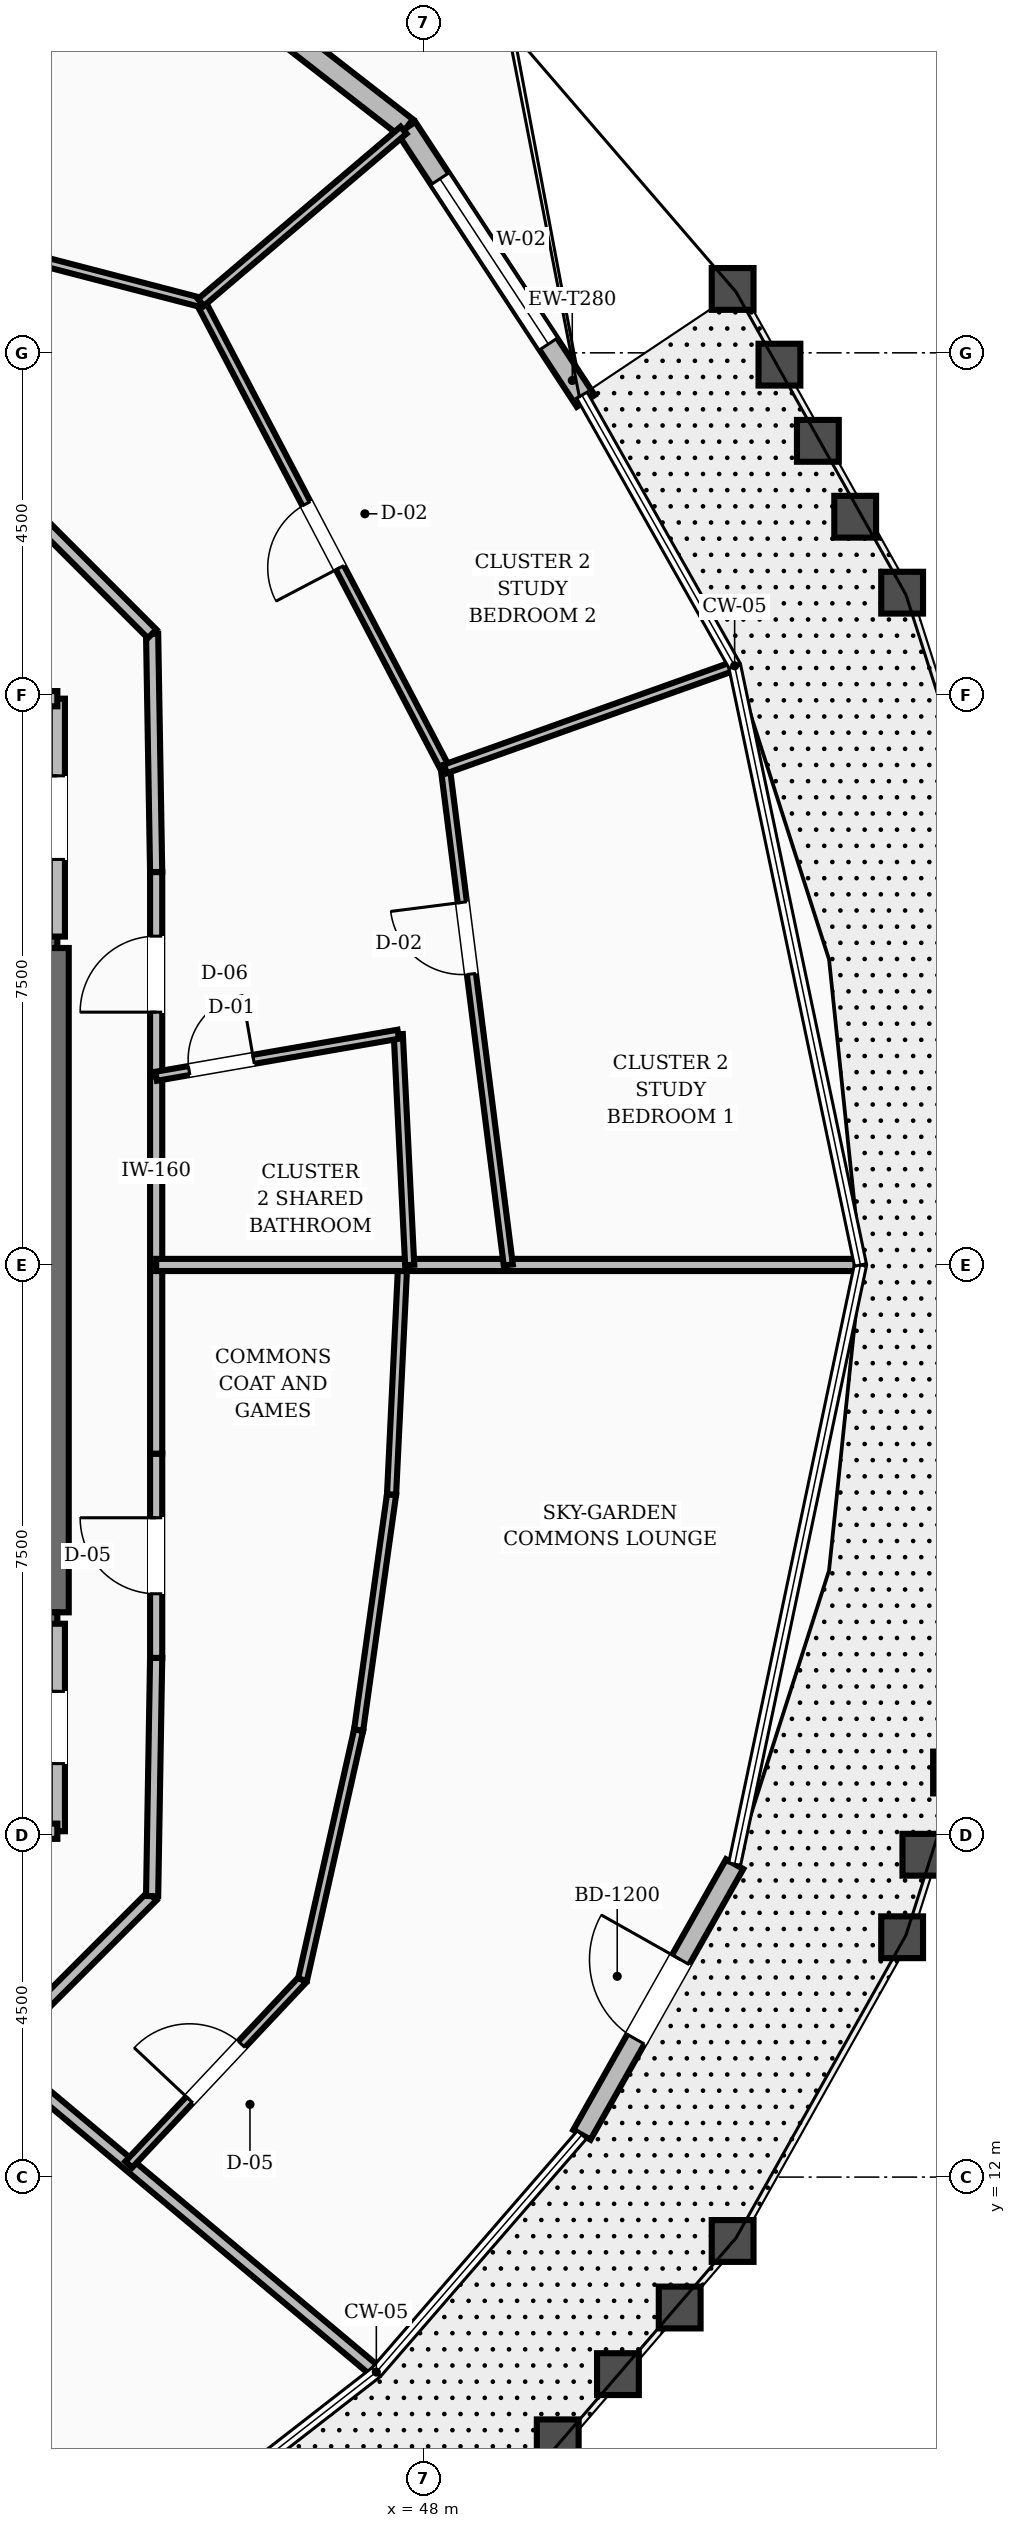
"""IFC4 building model, lengths in metres.
Left out: names, types, materials, properties, quantities, classifications, styles, units other than length and angle.
Written with IfcOpenShell. Run it as: python <this file> out.ifc"""

import sys

from ifc_helpers import new_model, si_unit, direction, frame, frame_2d, origin, place, context, subcontext, project, spatial, rectangle, extrude, element, fill, save


model = new_model("IFC4")
c1 = context("Model", 3, precision=1e-05, world=origin(), true_north=direction((0.0, 1.0)))
c2 = subcontext(c1, "Body", "Model", "MODEL_VIEW")
j1 = project(units=[si_unit("LENGTHUNIT", "METRE"), si_unit("PLANEANGLEUNIT", "RADIAN")], contexts=[c1])
p1 = place(None, origin())
s1 = spatial("IfcSite", under=j1, at=p1, CompositionType="ELEMENT")
p2 = place(p1, origin())
s2 = spatial("IfcBuilding", under=s1, at=p2, CompositionType="ELEMENT")
p3 = place(p2, frame((0.0, 0.0, 232.8)))
s3 = spatial("IfcBuildingStorey", under=s2, at=p3, CompositionType="ELEMENT", Elevation=232.8)
p4 = place(p3, frame((43.18, 19.43, 0.0), z_axis=(0.0, 0.0, 1.0), x_axis=(0.0, 1.0, 0.0)))
e1 = element("IfcWall", 1, at=p4, inside=s3, PredefinedType="SHEAR", context=c2, shape_type="SweptSolid", body=[
    extrude(rectangle(XDim=8.74, YDim=0.3, at=frame_2d((4.37, 0.0))), origin(), (0.0, 0.0, 1.0), 3.6),
])
p5 = place(p3, frame((39.58, 19.28, 0.0), z_axis=(0.0, 0.0, 1.0), x_axis=(1.0, 0.0, 0.0)))
e2 = element("IfcWall", 2, at=p5, inside=s3, PredefinedType="SHEAR", context=c2, shape_type="SweptSolid", body=[
    extrude(rectangle(XDim=3.6, YDim=0.3, at=frame_2d((1.8, 0.0))), origin(), (0.0, 0.0, 1.0), 3.6),
])
p6 = place(p3, frame((39.58, 28.32, 0.0), z_axis=(0.0, 0.0, 1.0), x_axis=(1.0, 0.0, 0.0)))
e3 = element("IfcWall", 3, at=p6, inside=s3, PredefinedType="SHEAR", context=c2, shape_type="SweptSolid", body=[
    extrude(rectangle(XDim=3.6, YDim=0.3, at=frame_2d((1.8, 0.0))), origin(), (0.0, 0.0, 1.0), 3.6),
])
p7 = place(p6, frame((1.3, 0.0, 0.0)))
e4 = element("IfcOpeningElement", 4, at=p7, cuts=e3, PredefinedType="OPENING", context=c2, shape_type="SweptSolid", body=[
    extrude(rectangle(XDim=1.1, YDim=2.1, at=frame_2d((0.55, 1.05))), frame((0.0, 0.16, 0.0), z_axis=(0.0, -1.0, 0.0), x_axis=(1.0, 0.0, 0.0)), (0.0, 0.0, 1.0), 0.32),
])
p8 = place(p3, frame((50.132, 35.367, 0.0), z_axis=(0.0, 0.0, 1.0), x_axis=(-0.548657681843, 0.836047096852, 0.0)))
e5 = element("IfcWall", 5, at=p8, inside=s3, PredefinedType="STANDARD", context=c2, shape_type="SweptSolid", body=[
    extrude(rectangle(XDim=4.299, YDim=0.28, at=frame_2d((2.15, 0.0))), origin(), (0.0, 0.0, 1.0), 2.88),
])
p9 = place(p8, frame((0.896, 0.0, 0.8)))
e6 = element("IfcOpeningElement", 6, at=p9, cuts=e5, PredefinedType="OPENING", context=c2, shape_type="SweptSolid", body=[
    extrude(rectangle(XDim=2.6, YDim=1.65, at=frame_2d((1.3, 0.825))), frame((0.0, 0.15, 0.0), z_axis=(0.0, -1.0, 0.0), x_axis=(1.0, 0.0, 0.0)), (0.0, 0.0, 1.0), 0.3),
])
p10 = place(p3, frame((47.773, 38.961, 0.0), z_axis=(0.0, 0.0, 1.0), x_axis=(-0.789112773216, 0.614248346475, 0.0)))
e7 = element("IfcWall", 7, at=p10, inside=s3, PredefinedType="STANDARD", context=c2, shape_type="SweptSolid", body=[
    extrude(rectangle(XDim=4.283, YDim=0.28, at=frame_2d((2.142, 0.0))), origin(), (0.0, 0.0, 1.0), 2.88),
])
p11 = place(p3, frame((50.081, 12.556, 0.0), z_axis=(0.0, 0.0, 1.0), x_axis=(0.491457065187, 0.870901804498, 0.0)))
e8 = element("IfcWall", 8, at=p11, inside=s3, PredefinedType="STANDARD", context=c2, shape_type="SweptSolid", body=[
    extrude(rectangle(XDim=4.089, YDim=0.26, at=frame_2d((2.044, 0.0))), origin(), (0.0, 0.0, 1.0), 2.88),
])
p12 = place(p11, frame((1.445, 0.0, 0.0)))
e9 = element("IfcOpeningElement", 9, at=p12, cuts=e8, PredefinedType="OPENING", context=c2, shape_type="SweptSolid", body=[
    extrude(rectangle(XDim=1.2, YDim=2.15, at=frame_2d((0.6, 1.075))), frame((0.0, 0.14, 0.0), z_axis=(0.0, -1.0, 0.0), x_axis=(1.0, 0.0, 0.0)), (0.0, 0.0, 1.0), 0.28),
])
p13 = place(p3, frame((43.18, 28.32, 0.0), z_axis=(0.0, 0.0, 1.0), x_axis=(0.0, 1.0, 0.0)))
e10 = element("IfcWall", 10, at=p13, inside=s3, PredefinedType="SOLIDWALL", context=c2, shape_type="SweptSolid", body=[
    extrude(rectangle(XDim=3.13, YDim=0.2, at=frame_2d((1.565, 0.0))), origin(), (0.0, 0.0, 1.0), 2.87),
])
p14 = place(p13, frame((1.015, 0.0, 0.0)))
e11 = element("IfcOpeningElement", 11, at=p14, cuts=e10, PredefinedType="OPENING", context=c2, shape_type="SweptSolid", body=[
    extrude(rectangle(XDim=1.1, YDim=2.1, at=frame_2d((0.55, 1.05))), frame((0.0, 0.11, 0.0), z_axis=(0.0, -1.0, 0.0), x_axis=(1.0, 0.0, 0.0)), (0.0, 0.0, 1.0), 0.22),
])
p15 = place(p3, frame((39.2, 31.45, 0.0), z_axis=(0.0, 0.0, 1.0), x_axis=(1.0, 0.0, 0.0)))
e12 = element("IfcWall", 12, at=p15, inside=s3, PredefinedType="SOLIDWALL", context=c2, shape_type="SweptSolid", body=[
    extrude(rectangle(XDim=3.98, YDim=0.2, at=frame_2d((1.99, 0.0))), origin(), (0.0, 0.0, 1.0), 2.87),
])
p16 = place(p3, frame((43.18, 16.55, 0.0), z_axis=(0.0, 0.0, 1.0), x_axis=(0.0, 1.0, 0.0)))
e13 = element("IfcWall", 13, at=p16, inside=s3, PredefinedType="SOLIDWALL", context=c2, shape_type="SweptSolid", body=[
    extrude(rectangle(XDim=2.73, YDim=0.2, at=frame_2d((1.365, 0.0))), origin(), (0.0, 0.0, 1.0), 2.87),
])
p17 = place(p16, frame((0.89, 0.0, 0.0)))
e14 = element("IfcOpeningElement", 14, at=p17, cuts=e13, PredefinedType="OPENING", context=c2, shape_type="SweptSolid", body=[
    extrude(rectangle(XDim=0.95, YDim=2.1, at=frame_2d((0.475, 1.05))), frame((0.0, 0.11, 0.0), z_axis=(0.0, -1.0, 0.0), x_axis=(1.0, 0.0, 0.0)), (0.0, 0.0, 1.0), 0.22),
])
p18 = place(p3, frame((39.2, 16.55, 0.0), z_axis=(0.0, 0.0, 1.0), x_axis=(1.0, 0.0, 0.0)))
e15 = element("IfcWall", 15, at=p18, inside=s3, PredefinedType="SOLIDWALL", context=c2, shape_type="SweptSolid", body=[
    extrude(rectangle(XDim=3.98, YDim=0.2, at=frame_2d((1.99, 0.0))), origin(), (0.0, 0.0, 1.0), 2.87),
])
p19 = place(p3, frame((44.48, 24.0, 0.0), z_axis=(0.0, 0.0, 1.0), x_axis=(0.0, 1.0, 0.0)))
e16 = element("IfcWall", 16, at=p19, inside=s3, PredefinedType="SOLIDWALL", context=c2, shape_type="SweptSolid", body=[
    extrude(rectangle(XDim=2.482, YDim=0.16, at=frame_2d((1.241, 0.0))), origin(), (0.0, 0.0, 1.0), 2.87),
])
p20 = place(p3, frame((44.48, 26.482, 0.0), z_axis=(0.0, 0.0, 1.0), x_axis=(0.0, 1.0, 0.0)))
e17 = element("IfcWall", 17, at=p20, inside=s3, PredefinedType="SOLIDWALL", context=c2, shape_type="SweptSolid", body=[
    extrude(rectangle(XDim=2.687, YDim=0.16, at=frame_2d((1.344, 0.0))), origin(), (0.0, 0.0, 1.0), 2.87),
])
p21 = place(p20, frame((0.844, 0.0, 0.0)))
e18 = element("IfcOpeningElement", 18, at=p21, cuts=e17, PredefinedType="OPENING", context=c2, shape_type="SweptSolid", body=[
    extrude(rectangle(XDim=1.0, YDim=2.1, at=frame_2d((0.5, 1.05))), frame((0.0, 0.09, 0.0), z_axis=(0.0, -1.0, 0.0), x_axis=(1.0, 0.0, 0.0)), (0.0, 0.0, 1.0), 0.18),
])
p22 = place(p3, frame((44.48, 29.169, 0.0), z_axis=(0.0, 0.0, 1.0), x_axis=(-0.016981035134, 0.999855811828, 0.0)))
e19 = element("IfcWall", 19, at=p22, inside=s3, PredefinedType="SOLIDWALL", context=c2, shape_type="SweptSolid", body=[
    extrude(rectangle(XDim=3.134, YDim=0.16, at=frame_2d((1.567, 0.0))), origin(), (0.0, 0.0, 1.0), 2.87),
])
for number, where, z_axis, x_axis in (
    (20, (44.427, 32.303, 0.0), (0.0, 0.0, 1.0), (-0.707, 0.707, 0.0)),
    (21, (42.365, 13.635, 0.0), (0.0, 0.0, 1.0), (0.707, 0.707, 0.0)),
):
    element("IfcWall", number, at=place(p3, frame(where, z_axis=z_axis, x_axis=x_axis)), inside=s3, PredefinedType="SOLIDWALL", context=c2, shape_type="SweptSolid", body=[
        extrude(rectangle(XDim=2.916, YDim=0.16, at=frame_2d((1.458, 0.0))), origin(), (0.0, 0.0, 1.0), 2.87),
    ])
p23 = place(p3, frame((44.427, 15.697, 0.0), z_axis=(0.0, 0.0, 1.0), x_axis=(0.016981035134, 0.999855811828, 0.0)))
e22 = element("IfcWall", 22, at=p23, inside=s3, PredefinedType="SOLIDWALL", context=c2, shape_type="SweptSolid", body=[
    extrude(rectangle(XDim=3.134, YDim=0.16, at=frame_2d((1.567, 0.0))), origin(), (0.0, 0.0, 1.0), 2.87),
])
p24 = place(p3, frame((44.48, 18.831, 0.0), z_axis=(0.0, 0.0, 1.0), x_axis=(0.0, 1.0, 0.0)))
e23 = element("IfcWall", 23, at=p24, inside=s3, PredefinedType="SOLIDWALL", context=c2, shape_type="SweptSolid", body=[
    extrude(rectangle(XDim=2.687, YDim=0.16, at=frame_2d((1.344, 0.0))), origin(), (0.0, 0.0, 1.0), 2.87),
])
p25 = place(p24, frame((0.844, 0.0, 0.0)))
e24 = element("IfcOpeningElement", 24, at=p25, cuts=e23, PredefinedType="OPENING", context=c2, shape_type="SweptSolid", body=[
    extrude(rectangle(XDim=1.0, YDim=2.1, at=frame_2d((0.5, 1.05))), frame((0.0, 0.09, 0.0), z_axis=(0.0, -1.0, 0.0), x_axis=(1.0, 0.0, 0.0)), (0.0, 0.0, 1.0), 0.18),
])
p26 = place(p3, frame((44.48, 21.518, 0.0), z_axis=(0.0, 0.0, 1.0), x_axis=(0.0, 1.0, 0.0)))
e25 = element("IfcWall", 25, at=p26, inside=s3, PredefinedType="SOLIDWALL", context=c2, shape_type="SweptSolid", body=[
    extrude(rectangle(XDim=2.482, YDim=0.16, at=frame_2d((1.241, 0.0))), origin(), (0.0, 0.0, 1.0), 2.87),
])
p27 = place(p3, frame((42.365, 13.635, 0.0), z_axis=(0.0, 0.0, 1.0), x_axis=(0.766438880931, -0.642317243889, 0.0)))
e26 = element("IfcWall", 26, at=p27, inside=s3, PredefinedType="SOLIDWALL", context=c2, shape_type="SweptSolid", body=[
    extrude(rectangle(XDim=6.489, YDim=0.16, at=frame_2d((3.245, 0.0))), origin(), (0.0, 0.0, 1.0), 2.87),
])
p28 = place(p3, frame((44.119, 12.165, 0.0), z_axis=(0.0, 0.0, 1.0), x_axis=(0.684903797097, 0.728633507823, 0.0)))
e27 = element("IfcWall", 27, at=p28, inside=s3, PredefinedType="PARTITIONING", context=c2, shape_type="SweptSolid", body=[
    extrude(rectangle(XDim=3.339, YDim=0.12, at=frame_2d((1.669, 0.0))), origin(), (0.0, 0.0, 1.0), 2.87),
])
p29 = place(p28, frame((1.169, 0.0, 0.0)))
e28 = element("IfcOpeningElement", 28, at=p29, cuts=e27, PredefinedType="OPENING", context=c2, shape_type="SweptSolid", body=[
    extrude(rectangle(XDim=1.0, YDim=2.1, at=frame_2d((0.5, 1.05))), frame((0.0, 0.07, 0.0), z_axis=(0.0, -1.0, 0.0), x_axis=(1.0, 0.0, 0.0)), (0.0, 0.0, 1.0), 0.14),
])
p30 = place(p3, frame((46.406, 14.598, 0.0), z_axis=(0.0, 0.0, 1.0), x_axis=(0.219303315939, 0.975656730422, 0.0)))
e29 = element("IfcWall", 29, at=p30, inside=s3, PredefinedType="PARTITIONING", context=c2, shape_type="SweptSolid", body=[
    extrude(rectangle(XDim=3.365, YDim=0.12, at=frame_2d((1.683, 0.0))), origin(), (0.0, 0.0, 1.0), 2.87),
])
p31 = place(p3, frame((47.144, 17.881, 0.0), z_axis=(0.0, 0.0, 1.0), x_axis=(0.138416734292, 0.990374074614, 0.0)))
e30 = element("IfcWall", 30, at=p31, inside=s3, PredefinedType="PARTITIONING", context=c2, shape_type="SweptSolid", body=[
    extrude(rectangle(XDim=3.129, YDim=0.12, at=frame_2d((1.564, 0.0))), origin(), (0.0, 0.0, 1.0), 2.87),
])
p32 = place(p3, frame((47.577, 20.98, 0.0), z_axis=(0.0, 0.0, 1.0), x_axis=(0.048366932207, 0.998829635057, 0.0)))
e31 = element("IfcWall", 31, at=p32, inside=s3, PredefinedType="PARTITIONING", context=c2, shape_type="SweptSolid", body=[
    extrude(rectangle(XDim=3.023, YDim=0.12, at=frame_2d((1.512, 0.0))), origin(), (0.0, 0.0, 1.0), 2.87),
])
p33 = place(p3, frame((44.48, 24.0, 0.0), z_axis=(0.0, 0.0, 1.0), x_axis=(1.0, 0.0, 0.0)))
e32 = element("IfcWall", 32, at=p33, inside=s3, PredefinedType="SOLIDWALL", context=c2, shape_type="SweptSolid", body=[
    extrude(rectangle(XDim=9.216, YDim=0.16, at=frame_2d((4.608, 0.0))), origin(), (0.0, 0.0, 1.0), 2.87),
])
p34 = place(p3, frame((47.816, 24.0, 0.0), z_axis=(0.0, 0.0, 1.0), x_axis=(-0.049484864646, 0.998774873618, 0.0)))
e33 = element("IfcWall", 33, at=p34, inside=s3, PredefinedType="PARTITIONING", context=c2, shape_type="SweptSolid", body=[
    extrude(rectangle(XDim=3.039, YDim=0.12, at=frame_2d((1.52, 0.0))), origin(), (0.0, 0.0, 1.0), 2.87),
])
p35 = place(p3, frame((44.48, 26.482, 0.0), z_axis=(0.0, 0.0, 1.0), x_axis=(0.985263255419, 0.171044782212, 0.0)))
e34 = element("IfcWall", 34, at=p35, inside=s3, PredefinedType="PARTITIONING", context=c2, shape_type="SweptSolid", body=[
    extrude(rectangle(XDim=3.233, YDim=0.12, at=frame_2d((1.616, 0.0))), origin(), (0.0, 0.0, 1.0), 2.87),
])
p36 = place(p35, frame((0.44, 0.0, 0.0)))
e35 = element("IfcOpeningElement", 35, at=p36, cuts=e34, PredefinedType="OPENING", context=c2, shape_type="SweptSolid", body=[
    extrude(rectangle(XDim=0.86, YDim=2.1, at=frame_2d((0.43, 1.05))), frame((0.0, 0.07, 0.0), z_axis=(0.0, -1.0, 0.0), x_axis=(1.0, 0.0, 0.0)), (0.0, 0.0, 1.0), 0.14),
])
p37 = place(p3, frame((49.113, 24.0, 0.0), z_axis=(0.0, 0.0, 1.0), x_axis=(-0.125779473563, 0.992058226129, 0.0)))
e36 = element("IfcWall", 36, at=p37, inside=s3, PredefinedType="PARTITIONING", context=c2, shape_type="SweptSolid", body=[
    extrude(rectangle(XDim=6.578, YDim=0.12, at=frame_2d((3.289, 0.0))), origin(), (0.0, 0.0, 1.0), 2.87),
])
p38 = place(p37, frame((3.859, 0.0, 0.0)))
e37 = element("IfcOpeningElement", 37, at=p38, cuts=e36, PredefinedType="OPENING", context=c2, shape_type="SweptSolid", body=[
    extrude(rectangle(XDim=0.95, YDim=2.1, at=frame_2d((0.475, 1.05))), frame((0.0, 0.07, 0.0), z_axis=(0.0, -1.0, 0.0), x_axis=(1.0, 0.0, 0.0)), (0.0, 0.0, 1.0), 0.14),
])
p39 = place(p3, frame((48.285, 30.526, 0.0), z_axis=(0.0, 0.0, 1.0), x_axis=(-0.464213686546, 0.885723237373, 0.0)))
e38 = element("IfcWall", 38, at=p39, inside=s3, PredefinedType="PARTITIONING", context=c2, shape_type="SweptSolid", body=[
    extrude(rectangle(XDim=6.929, YDim=0.12, at=frame_2d((3.464, 0.0))), origin(), (0.0, 0.0, 1.0), 2.87),
])
p40 = place(p39, frame((2.99, 0.0, 0.0)))
e39 = element("IfcOpeningElement", 39, at=p40, cuts=e38, PredefinedType="OPENING", context=c2, shape_type="SweptSolid", body=[
    extrude(rectangle(XDim=0.95, YDim=2.1, at=frame_2d((0.475, 1.05))), frame((0.0, 0.07, 0.0), z_axis=(0.0, -1.0, 0.0), x_axis=(1.0, 0.0, 0.0)), (0.0, 0.0, 1.0), 0.14),
])
p41 = place(p3, frame((48.285, 30.526, 0.0), z_axis=(0.0, 0.0, 1.0), x_axis=(0.941925899745, 0.335820784629, 0.0)))
e40 = element("IfcWall", 40, at=p41, inside=s3, PredefinedType="PARTITIONING", context=c2, shape_type="SweptSolid", body=[
    extrude(rectangle(XDim=3.99, YDim=0.12, at=frame_2d((1.995, 0.0))), origin(), (0.0, 0.0, 1.0), 2.87),
])
p42 = place(p3, frame((45.069, 36.663, 0.0), z_axis=(0.0, 0.0, 1.0), x_axis=(-0.967790308664, 0.251757658186, 0.0)))
e41 = element("IfcWall", 41, at=p42, inside=s3, PredefinedType="PARTITIONING", context=c2, shape_type="SweptSolid", body=[
    extrude(rectangle(XDim=7.093, YDim=0.12, at=frame_2d((3.546, 0.0))), origin(), (0.0, 0.0, 1.0), 2.87),
])
p43 = place(p42, frame((3.071, 0.0, 0.0)))
e42 = element("IfcOpeningElement", 42, at=p43, cuts=e41, PredefinedType="OPENING", context=c2, shape_type="SweptSolid", body=[
    extrude(rectangle(XDim=0.95, YDim=2.1, at=frame_2d((0.475, 1.05))), frame((0.0, 0.07, 0.0), z_axis=(0.0, -1.0, 0.0), x_axis=(1.0, 0.0, 0.0)), (0.0, 0.0, 1.0), 0.14),
])
p44 = place(p3, frame((45.069, 36.663, 0.0), z_axis=(0.0, 0.0, 1.0), x_axis=(0.761978918381, 0.647601828242, 0.0)))
e43 = element("IfcWall", 43, at=p44, inside=s3, PredefinedType="PARTITIONING", context=c2, shape_type="SweptSolid", body=[
    extrude(rectangle(XDim=3.499, YDim=0.12, at=frame_2d((1.749, 0.0))), origin(), (0.0, 0.0, 1.0), 2.87),
])
p45 = place(p9, origin())
e44 = element("IfcWindow", 44, at=p45, inside=s3, PartitioningType="SINGLE_PANEL", PredefinedType="WINDOW", context=c2, shape_type="SweptSolid", body=[
    extrude(rectangle(XDim=2.6, YDim=1.65, at=frame_2d((1.3, 0.825))), frame((0.0, 0.03, 0.0), z_axis=(0.0, -1.0, 0.0), x_axis=(1.0, 0.0, 0.0)), (0.0, 0.0, 1.0), 0.06),
])
fill(e6, e44)
p46 = place(p12, origin())
e45 = element("IfcDoor", 45, at=p46, inside=s3, OperationType="SINGLE_SWING_RIGHT", PredefinedType="DOOR", context=c2, shape_type="SweptSolid", body=[
    extrude(rectangle(XDim=1.2, YDim=2.15, at=frame_2d((0.6, 1.075))), frame((0.0, 0.025, 0.0), z_axis=(0.0, -1.0, 0.0), x_axis=(1.0, 0.0, 0.0)), (0.0, 0.0, 1.0), 0.05),
])
fill(e9, e45)
p47 = place(p14, origin())
e46 = element("IfcDoor", 46, at=p47, inside=s3, OperationType="SINGLE_SWING_RIGHT", PredefinedType="DOOR", context=c2, shape_type="SweptSolid", body=[
    extrude(rectangle(XDim=1.1, YDim=2.1, at=frame_2d((0.55, 1.05))), frame((0.0, 0.025, 0.0), z_axis=(0.0, -1.0, 0.0), x_axis=(1.0, 0.0, 0.0)), (0.0, 0.0, 1.0), 0.05),
])
fill(e11, e46)
p48 = place(p17, origin())
e47 = element("IfcDoor", 47, at=p48, inside=s3, OperationType="SINGLE_SWING_RIGHT", PredefinedType="DOOR", context=c2, shape_type="SweptSolid", body=[
    extrude(rectangle(XDim=0.95, YDim=2.1, at=frame_2d((0.475, 1.05))), frame((0.0, 0.025, 0.0), z_axis=(0.0, -1.0, 0.0), x_axis=(1.0, 0.0, 0.0)), (0.0, 0.0, 1.0), 0.05),
])
fill(e14, e47)
p49 = place(p25, origin())
e48 = element("IfcDoor", 48, at=p49, inside=s3, OperationType="SINGLE_SWING_RIGHT", PredefinedType="DOOR", context=c2, shape_type="SweptSolid", body=[
    extrude(rectangle(XDim=1.0, YDim=2.1, at=frame_2d((0.5, 1.05))), frame((0.0, 0.025, 0.0), z_axis=(0.0, -1.0, 0.0), x_axis=(1.0, 0.0, 0.0)), (0.0, 0.0, 1.0), 0.05),
])
fill(e24, e48)
p50 = place(p29, origin())
e49 = element("IfcDoor", 49, at=p50, inside=s3, OperationType="SINGLE_SWING_LEFT", PredefinedType="DOOR", context=c2, shape_type="SweptSolid", body=[
    extrude(rectangle(XDim=1.0, YDim=2.1, at=frame_2d((0.5, 1.05))), frame((0.0, 0.025, 0.0), z_axis=(0.0, -1.0, 0.0), x_axis=(1.0, 0.0, 0.0)), (0.0, 0.0, 1.0), 0.05),
])
fill(e28, e49)
p51 = place(p36, origin())
e50 = element("IfcDoor", 50, at=p51, inside=s3, OperationType="SINGLE_SWING_RIGHT", PredefinedType="DOOR", context=c2, shape_type="SweptSolid", body=[
    extrude(rectangle(XDim=0.86, YDim=2.1, at=frame_2d((0.43, 1.05))), frame((0.0, 0.025, 0.0), z_axis=(0.0, -1.0, 0.0), x_axis=(1.0, 0.0, 0.0)), (0.0, 0.0, 1.0), 0.05),
])
fill(e35, e50)
p52 = place(p21, origin())
e51 = element("IfcDoor", 51, at=p52, inside=s3, OperationType="SINGLE_SWING_LEFT", PredefinedType="DOOR", context=c2, shape_type="SweptSolid", body=[
    extrude(rectangle(XDim=1.0, YDim=2.1, at=frame_2d((0.5, 1.05))), frame((0.0, 0.025, 0.0), z_axis=(0.0, -1.0, 0.0), x_axis=(1.0, 0.0, 0.0)), (0.0, 0.0, 1.0), 0.05),
])
fill(e18, e51)
p53 = place(p38, origin())
e52 = element("IfcDoor", 52, at=p53, inside=s3, OperationType="SINGLE_SWING_RIGHT", PredefinedType="DOOR", context=c2, shape_type="SweptSolid", body=[
    extrude(rectangle(XDim=0.95, YDim=2.1, at=frame_2d((0.475, 1.05))), frame((0.0, 0.025, 0.0), z_axis=(0.0, -1.0, 0.0), x_axis=(1.0, 0.0, 0.0)), (0.0, 0.0, 1.0), 0.05),
])
fill(e37, e52)
p54 = place(p40, origin())
e53 = element("IfcDoor", 53, at=p54, inside=s3, OperationType="SINGLE_SWING_LEFT", PredefinedType="DOOR", context=c2, shape_type="SweptSolid", body=[
    extrude(rectangle(XDim=0.95, YDim=2.1, at=frame_2d((0.475, 1.05))), frame((0.0, 0.025, 0.0), z_axis=(0.0, -1.0, 0.0), x_axis=(1.0, 0.0, 0.0)), (0.0, 0.0, 1.0), 0.05),
])
fill(e39, e53)
save(model, sys.argv[1])
